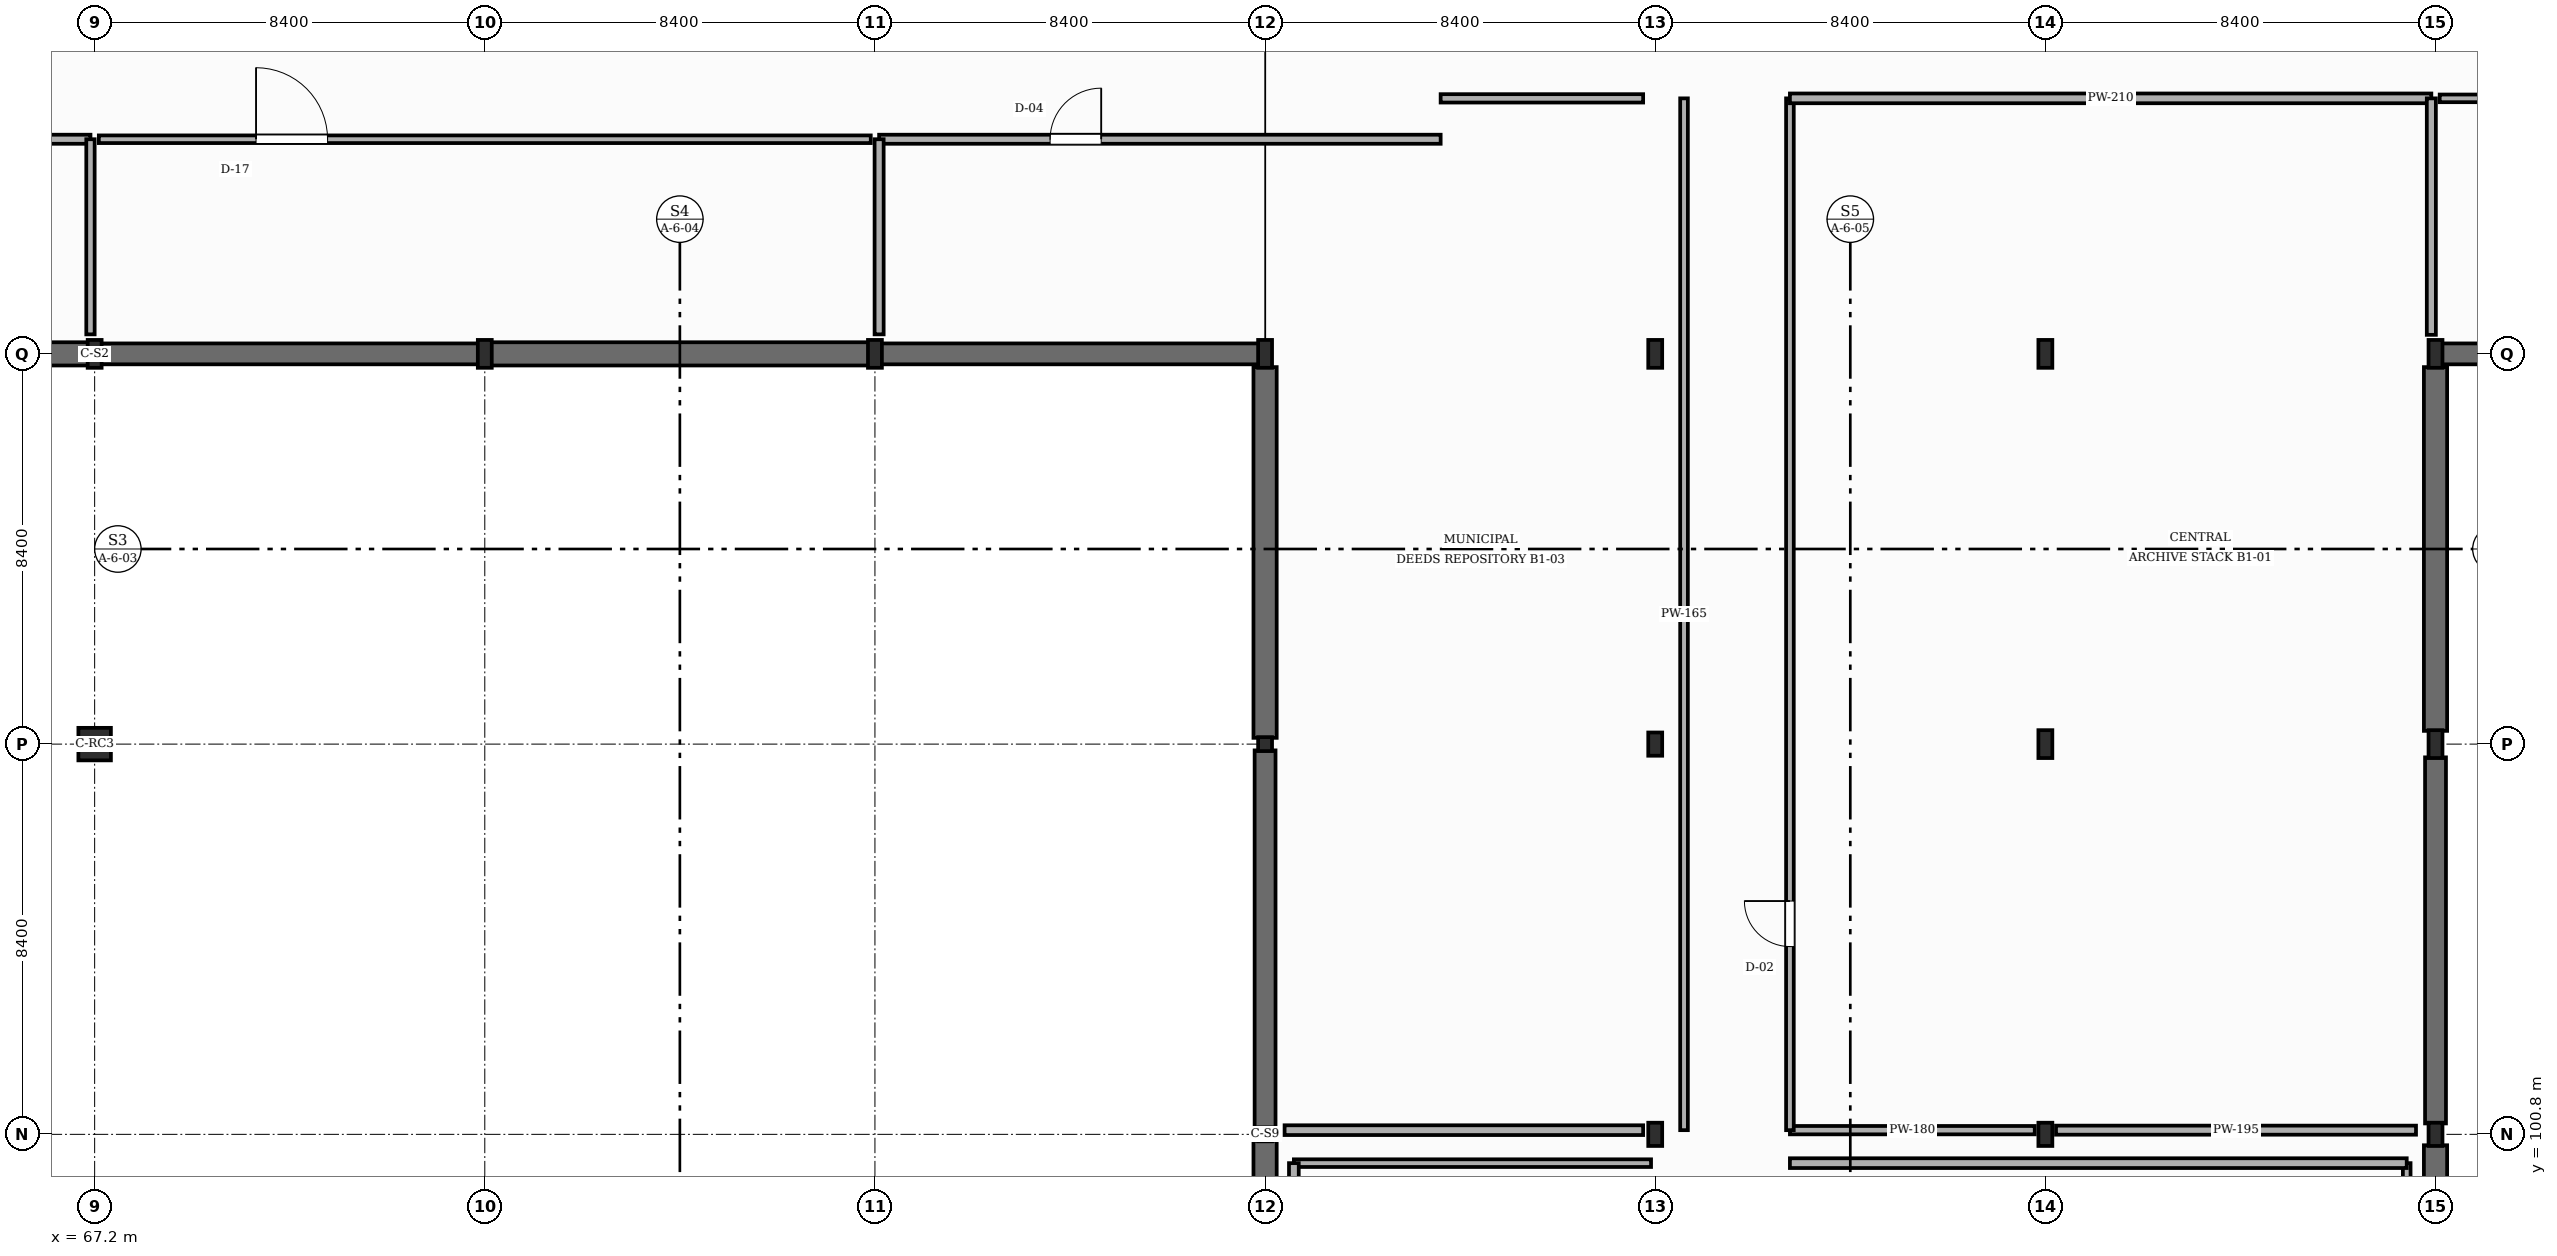
"""IFC4 building model, lengths in metres.
Left out: names, types, materials, properties, quantities, classifications, styles, units other than length and angle.
Written with IfcOpenShell. Run it as: python <this file> out.ifc"""

import sys

from ifc_helpers import new_model, si_unit, direction, frame, frame_2d, origin, origin_2d, place, context, subcontext, project, spatial, rectangle, i_section, extrude, element, fill, save


model = new_model("IFC4")
c1 = context("Model", 3, precision=1e-05, world=origin(), true_north=direction((0.0, 1.0)))
c2 = subcontext(c1, "Body", "Model", "MODEL_VIEW")
j1 = project(units=[si_unit("LENGTHUNIT", "METRE"), si_unit("PLANEANGLEUNIT", "RADIAN")], contexts=[c1])
p1 = place(None, origin())
s1 = spatial("IfcSite", under=j1, at=p1, CompositionType="ELEMENT")
p2 = place(p1, origin())
s2 = spatial("IfcBuilding", under=s1, at=p2, CompositionType="ELEMENT")
p3 = place(p2, frame((0.0, 0.0, -4.5)))
s3 = spatial("IfcBuildingStorey", under=s2, at=p3, CompositionType="ELEMENT", Elevation=-4.5)
p4 = place(p3, frame((67.2, 109.2, 0.0), z_axis=(0.0, 0.0, 1.0), x_axis=(1.0, 0.0, 0.0)))
e1 = element("IfcColumn", 1, at=p4, inside=s3, PredefinedType="COLUMN", context=c2, shape_type="SweptSolid", body=[
    extrude(rectangle(XDim=0.7, YDim=0.7, at=origin_2d()), origin(), (0.0, 0.0, 1.0), 4.5),
])
for number, where, z_axis, x_axis in (
    (2, (67.2, 117.6, 0.0), (0.0, 0.0, 1.0), (1.0, 0.0, 0.0)),
    (3, (75.6, 117.6, 0.0), (0.0, 0.0, 1.0), (1.0, 0.0, 0.0)),
    (4, (84.0, 117.6, 0.0), (0.0, 0.0, 1.0), (1.0, 0.0, 0.0)),
):
    element("IfcColumn", number, at=place(p3, frame(where, z_axis=z_axis, x_axis=x_axis)), inside=s3, PredefinedType="COLUMN", context=c2, shape_type="SweptSolid", body=[
        extrude(i_section(OverallWidth=0.3, OverallDepth=0.6, WebThickness=0.015, FlangeThickness=0.03, FilletRadius=0.027, at=origin_2d()), origin(), (0.0, 0.0, 1.0), 4.5),
    ])
for number, where, z_axis, x_axis in (
    (5, (92.4, 100.8, 0.0), (0.0, 0.0, 1.0), (1.0, 0.0, 0.0)),
    (6, (92.4, 109.2, 0.0), (0.0, 0.0, 1.0), (1.0, 0.0, 0.0)),
):
    element("IfcColumn", number, at=place(p3, frame(where, z_axis=z_axis, x_axis=x_axis)), inside=s3, PredefinedType="COLUMN", context=c2, shape_type="SweptSolid", body=[
        extrude(i_section(OverallWidth=0.3, OverallDepth=0.3, WebThickness=0.011, FlangeThickness=0.019, FilletRadius=0.027, at=origin_2d()), origin(), (0.0, 0.0, 1.0), 4.5),
    ])
p5 = place(p3, frame((92.4, 117.6, 0.0), z_axis=(0.0, 0.0, 1.0), x_axis=(1.0, 0.0, 0.0)))
e7 = element("IfcColumn", 7, at=p5, inside=s3, PredefinedType="COLUMN", context=c2, shape_type="SweptSolid", body=[
    extrude(i_section(OverallWidth=0.3, OverallDepth=0.6, WebThickness=0.015, FlangeThickness=0.03, FilletRadius=0.027, at=origin_2d()), origin(), (0.0, 0.0, 1.0), 4.5),
])
for number, where, z_axis, x_axis in (
    (8, (100.8, 100.8, 0.0), (0.0, 0.0, 1.0), (1.0, 0.0, 0.0)),
    (9, (100.8, 109.2, 0.0), (0.0, 0.0, 1.0), (1.0, 0.0, 0.0)),
):
    element("IfcColumn", number, at=place(p3, frame(where, z_axis=z_axis, x_axis=x_axis)), inside=s3, PredefinedType="COLUMN", context=c2, shape_type="SweptSolid", body=[
        extrude(i_section(OverallWidth=0.3, OverallDepth=0.5, WebThickness=0.014, FlangeThickness=0.028, FilletRadius=0.027, at=origin_2d()), origin(), (0.0, 0.0, 1.0), 4.5),
    ])
p6 = place(p3, frame((100.8, 117.6, 0.0), z_axis=(0.0, 0.0, 1.0), x_axis=(1.0, 0.0, 0.0)))
e10 = element("IfcColumn", 10, at=p6, inside=s3, PredefinedType="COLUMN", context=c2, shape_type="SweptSolid", body=[
    extrude(i_section(OverallWidth=0.3, OverallDepth=0.6, WebThickness=0.015, FlangeThickness=0.03, FilletRadius=0.027, at=origin_2d()), origin(), (0.0, 0.0, 1.0), 4.5),
])
p7 = place(p3, frame((109.2, 100.8, 0.0), z_axis=(0.0, 0.0, 1.0), x_axis=(1.0, 0.0, 0.0)))
e11 = element("IfcColumn", 11, at=p7, inside=s3, PredefinedType="COLUMN", context=c2, shape_type="SweptSolid", body=[
    extrude(i_section(OverallWidth=0.3, OverallDepth=0.5, WebThickness=0.014, FlangeThickness=0.028, FilletRadius=0.027, at=origin_2d()), origin(), (0.0, 0.0, 1.0), 4.5),
])
for number, where, z_axis, x_axis in (
    (12, (109.2, 109.2, 0.0), (0.0, 0.0, 1.0), (1.0, 0.0, 0.0)),
    (13, (109.2, 117.6, 0.0), (0.0, 0.0, 1.0), (1.0, 0.0, 0.0)),
):
    element("IfcColumn", number, at=place(p3, frame(where, z_axis=z_axis, x_axis=x_axis)), inside=s3, PredefinedType="COLUMN", context=c2, shape_type="SweptSolid", body=[
        extrude(i_section(OverallWidth=0.3, OverallDepth=0.6, WebThickness=0.015, FlangeThickness=0.03, FilletRadius=0.027, at=origin_2d()), origin(), (0.0, 0.0, 1.0), 4.5),
    ])
p8 = place(p3, frame((117.6, 100.8, 0.0), z_axis=(0.0, 0.0, 1.0), x_axis=(1.0, 0.0, 0.0)))
e14 = element("IfcColumn", 14, at=p8, inside=s3, PredefinedType="COLUMN", context=c2, shape_type="SweptSolid", body=[
    extrude(i_section(OverallWidth=0.3, OverallDepth=0.5, WebThickness=0.014, FlangeThickness=0.028, FilletRadius=0.027, at=origin_2d()), origin(), (0.0, 0.0, 1.0), 4.5),
])
for number, where, z_axis, x_axis in (
    (15, (117.6, 109.2, 0.0), (0.0, 0.0, 1.0), (1.0, 0.0, 0.0)),
    (16, (117.6, 117.6, 0.0), (0.0, 0.0, 1.0), (1.0, 0.0, 0.0)),
):
    element("IfcColumn", number, at=place(p3, frame(where, z_axis=z_axis, x_axis=x_axis)), inside=s3, PredefinedType="COLUMN", context=c2, shape_type="SweptSolid", body=[
        extrude(i_section(OverallWidth=0.3, OverallDepth=0.6, WebThickness=0.015, FlangeThickness=0.03, FilletRadius=0.027, at=origin_2d()), origin(), (0.0, 0.0, 1.0), 4.5),
    ])
p9 = place(p3, frame((117.6, 92.71, 0.0), z_axis=(0.0, 0.0, 1.0), x_axis=(0.0, 1.0, 0.0)))
e17 = element("IfcWall", 17, at=p9, inside=s3, PredefinedType="USERDEFINED", context=c2, shape_type="SweptSolid", body=[
    extrude(rectangle(XDim=7.855, YDim=0.5, at=frame_2d((3.927, 0.0))), origin(), (0.0, 0.0, 1.0), 4.25),
])
p10 = place(p3, frame((117.6, 101.035, 0.0), z_axis=(0.0, 0.0, 1.0), x_axis=(0.0, 1.0, 0.0)))
e18 = element("IfcWall", 18, at=p10, inside=s3, PredefinedType="USERDEFINED", context=c2, shape_type="SweptSolid", body=[
    extrude(rectangle(XDim=7.88, YDim=0.45, at=frame_2d((3.94, 0.0))), origin(), (0.0, 0.0, 1.0), 4.25),
])
p11 = place(p3, frame((117.6, 109.485, 0.0), z_axis=(0.0, 0.0, 1.0), x_axis=(0.0, 1.0, 0.0)))
e19 = element("IfcWall", 19, at=p11, inside=s3, PredefinedType="USERDEFINED", context=c2, shape_type="SweptSolid", body=[
    extrude(rectangle(XDim=7.83, YDim=0.5, at=frame_2d((3.915, 0.0))), origin(), (0.0, 0.0, 1.0), 4.25),
])
p12 = place(p3, frame((117.608, 117.6, 0.0), z_axis=(0.0, 0.0, 1.0), x_axis=(1.0, 0.0, 0.0)))
e20 = element("IfcWall", 20, at=p12, inside=s3, PredefinedType="USERDEFINED", context=c2, shape_type="SweptSolid", body=[
    extrude(rectangle(XDim=8.384, YDim=0.45, at=frame_2d((4.192, 0.0))), origin(), (0.0, 0.0, 1.0), 4.25),
])
p13 = place(p3, frame((58.808, 117.6, 0.0), z_axis=(0.0, 0.0, 1.0), x_axis=(1.0, 0.0, 0.0)))
e21 = element("IfcWall", 21, at=p13, inside=s3, PredefinedType="USERDEFINED", context=c2, shape_type="SweptSolid", body=[
    extrude(rectangle(XDim=8.384, YDim=0.5, at=frame_2d((4.192, 0.0))), origin(), (0.0, 0.0, 1.0), 4.25),
])
p14 = place(p3, frame((67.208, 117.6, 0.0), z_axis=(0.0, 0.0, 1.0), x_axis=(1.0, 0.0, 0.0)))
e22 = element("IfcWall", 22, at=p14, inside=s3, PredefinedType="USERDEFINED", context=c2, shape_type="SweptSolid", body=[
    extrude(rectangle(XDim=8.384, YDim=0.45, at=frame_2d((4.192, 0.0))), origin(), (0.0, 0.0, 1.0), 4.25),
])
p15 = place(p3, frame((75.608, 117.6, 0.0), z_axis=(0.0, 0.0, 1.0), x_axis=(1.0, 0.0, 0.0)))
e23 = element("IfcWall", 23, at=p15, inside=s3, PredefinedType="USERDEFINED", context=c2, shape_type="SweptSolid", body=[
    extrude(rectangle(XDim=8.384, YDim=0.5, at=frame_2d((4.192, 0.0))), origin(), (0.0, 0.0, 1.0), 4.25),
])
p16 = place(p3, frame((84.008, 117.6, 0.0), z_axis=(0.0, 0.0, 1.0), x_axis=(1.0, 0.0, 0.0)))
e24 = element("IfcWall", 24, at=p16, inside=s3, PredefinedType="USERDEFINED", context=c2, shape_type="SweptSolid", body=[
    extrude(rectangle(XDim=8.384, YDim=0.45, at=frame_2d((4.192, 0.0))), origin(), (0.0, 0.0, 1.0), 4.25),
])
p17 = place(p3, frame((92.4, 117.315, 0.0), z_axis=(0.0, 0.0, 1.0), x_axis=(0.0, -1.0, 0.0)))
e25 = element("IfcWall", 25, at=p17, inside=s3, PredefinedType="USERDEFINED", context=c2, shape_type="SweptSolid", body=[
    extrude(rectangle(XDim=7.98, YDim=0.5, at=frame_2d((3.99, 0.0))), origin(), (0.0, 0.0, 1.0), 4.25),
])
p18 = place(p3, frame((92.4, 109.065, 0.0), z_axis=(0.0, 0.0, 1.0), x_axis=(0.0, -1.0, 0.0)))
e26 = element("IfcWall", 26, at=p18, inside=s3, PredefinedType="USERDEFINED", context=c2, shape_type="SweptSolid", body=[
    extrude(rectangle(XDim=8.13, YDim=0.45, at=frame_2d((4.065, 0.0))), origin(), (0.0, 0.0, 1.0), 4.25),
])
p19 = place(p3, frame((92.4, 100.665, 0.0), z_axis=(0.0, 0.0, 1.0), x_axis=(0.0, -1.0, 0.0)))
e27 = element("IfcWall", 27, at=p19, inside=s3, PredefinedType="USERDEFINED", context=c2, shape_type="SweptSolid", body=[
    extrude(rectangle(XDim=7.955, YDim=0.5, at=frame_2d((3.978, 0.0))), origin(), (0.0, 0.0, 1.0), 4.25),
])
p20 = place(p3, frame((117.18, 100.89, -0.004), z_axis=(0.0, 0.0, 1.0), x_axis=(-1.0, 0.0, 0.0)))
e28 = element("IfcWall", 28, at=p20, inside=s3, PredefinedType="STANDARD", context=c2, shape_type="SweptSolid", body=[
    extrude(rectangle(XDim=7.751, YDim=0.195, at=frame_2d((3.875, 0.0))), origin(), (0.0, 0.0, 1.0), 3.736),
])
p21 = place(p3, frame((108.971, 100.89, -0.004), z_axis=(0.0, 0.0, 1.0), x_axis=(-1.0, 0.0, 0.0)))
e29 = element("IfcWall", 29, at=p21, inside=s3, PredefinedType="STANDARD", context=c2, shape_type="SweptSolid", body=[
    extrude(rectangle(XDim=5.271, YDim=0.18, at=frame_2d((2.636, 0.0))), origin(), (0.0, 0.0, 1.0), 3.686),
])
p22 = place(p3, frame((103.7, 100.89, -0.004), z_axis=(0.0, 0.0, 1.0), x_axis=(0.0, 1.0, 0.0)))
e30 = element("IfcWall", 30, at=p22, inside=s3, PredefinedType="STANDARD", context=c2, shape_type="SweptSolid", body=[
    extrude(rectangle(XDim=22.21, YDim=0.165, at=frame_2d((11.105, 0.0))), origin(), (0.0, 0.0, 1.0), 3.966),
])
p23 = place(p22, frame((3.952, 0.0, 0.015)))
e31 = element("IfcOpeningElement", 31, at=p23, cuts=e30, PredefinedType="OPENING", context=c2, shape_type="SweptSolid", body=[
    extrude(rectangle(XDim=0.98, YDim=2.06, at=frame_2d((0.49, 1.03))), frame((0.0, 0.093, 0.0), z_axis=(0.0, -1.0, 0.0), x_axis=(1.0, 0.0, 0.0)), (0.0, 0.0, 1.0), 0.185),
])
p24 = place(p3, frame((103.7, 123.1, -0.004), z_axis=(0.0, 0.0, 1.0), x_axis=(1.0, 0.0, 0.0)))
e32 = element("IfcWall", 32, at=p24, inside=s3, PredefinedType="STANDARD", context=c2, shape_type="SweptSolid", body=[
    extrude(rectangle(XDim=13.81, YDim=0.21, at=frame_2d((6.905, 0.0))), origin(), (0.0, 0.0, 1.0), 4.254),
])
p25 = place(p3, frame((117.51, 123.1, -0.004), z_axis=(0.0, 0.0, 1.0), x_axis=(0.0, -1.0, 0.0)))
e33 = element("IfcWall", 33, at=p25, inside=s3, PredefinedType="STANDARD", context=c2, shape_type="SweptSolid", body=[
    extrude(rectangle(XDim=5.09, YDim=0.195, at=frame_2d((2.545, 0.0))), origin(), (0.0, 0.0, 1.0), 3.926),
])
p26 = place(p3, frame((116.98, 97.9, -0.004), z_axis=(0.0, 0.0, 1.0), x_axis=(0.0, 1.0, 0.0)))
e34 = element("IfcWall", 34, at=p26, inside=s3, PredefinedType="STANDARD", context=c2, shape_type="SweptSolid", body=[
    extrude(rectangle(XDim=2.28, YDim=0.165, at=frame_2d((1.14, 0.0))), origin(), (0.0, 0.0, 1.0), 4.254),
])
p27 = place(p3, frame((116.98, 100.18, -0.004), z_axis=(0.0, 0.0, 1.0), x_axis=(-1.0, 0.0, 0.0)))
e35 = element("IfcWall", 35, at=p27, inside=s3, PredefinedType="STANDARD", context=c2, shape_type="SweptSolid", body=[
    extrude(rectangle(XDim=13.28, YDim=0.21, at=frame_2d((6.64, 0.0))), origin(), (0.0, 0.0, 1.0), 4.254),
])
p28 = place(p3, frame((84.09, 122.22, -0.004), z_axis=(0.0, 0.0, 1.0), x_axis=(1.0, 0.0, 0.0)))
e36 = element("IfcWall", 36, at=p28, inside=s3, PredefinedType="STANDARD", context=c2, shape_type="SweptSolid", body=[
    extrude(rectangle(XDim=12.09, YDim=0.195, at=frame_2d((6.045, 0.0))), origin(), (0.0, 0.0, 1.0), 4.254),
])
p29 = place(p28, frame((3.681, 0.0, 0.015)))
e37 = element("IfcOpeningElement", 37, at=p29, cuts=e36, PredefinedType="OPENING", context=c2, shape_type="SweptSolid", body=[
    extrude(rectangle(XDim=1.1, YDim=2.06, at=frame_2d((0.55, 1.03))), frame((0.0, 0.107, 0.0), z_axis=(0.0, -1.0, 0.0), x_axis=(1.0, 0.0, 0.0)), (0.0, 0.0, 1.0), 0.215),
])
p30 = place(p3, frame((96.18, 123.1, -0.004), z_axis=(0.0, 0.0, 1.0), x_axis=(1.0, 0.0, 0.0)))
e38 = element("IfcWall", 38, at=p30, inside=s3, PredefinedType="STANDARD", context=c2, shape_type="SweptSolid", body=[
    extrude(rectangle(XDim=4.36, YDim=0.18, at=frame_2d((2.18, 0.0))), origin(), (0.0, 0.0, 1.0), 4.254),
])
p31 = place(p3, frame((101.42, 123.1, -0.004), z_axis=(0.0, 0.0, 1.0), x_axis=(0.0, -1.0, 0.0)))
e39 = element("IfcWall", 39, at=p31, inside=s3, PredefinedType="STANDARD", context=c2, shape_type="SweptSolid", body=[
    extrude(rectangle(XDim=22.21, YDim=0.165, at=frame_2d((11.105, 0.0))), origin(), (0.0, 0.0, 1.0), 4.254),
])
p32 = place(p3, frame((100.54, 100.89, -0.004), z_axis=(0.0, 0.0, 1.0), x_axis=(-1.0, 0.0, 0.0)))
e40 = element("IfcWall", 40, at=p32, inside=s3, PredefinedType="STANDARD", context=c2, shape_type="SweptSolid", body=[
    extrude(rectangle(XDim=7.72, YDim=0.21, at=frame_2d((3.86, 0.0))), origin(), (0.0, 0.0, 1.0), 3.906),
])
p33 = place(p3, frame((84.09, 118.02, -0.004), z_axis=(0.0, 0.0, 1.0), x_axis=(0.0, 1.0, 0.0)))
e41 = element("IfcWall", 41, at=p33, inside=s3, PredefinedType="STANDARD", context=c2, shape_type="SweptSolid", body=[
    extrude(rectangle(XDim=4.2, YDim=0.195, at=frame_2d((2.1, 0.0))), origin(), (0.0, 0.0, 1.0), 3.636),
])
p34 = place(p3, frame((100.71, 100.18, -0.004), z_axis=(0.0, 0.0, 1.0), x_axis=(-1.0, 0.0, 0.0)))
e42 = element("IfcWall", 42, at=p34, inside=s3, PredefinedType="STANDARD", context=c2, shape_type="SweptSolid", body=[
    extrude(rectangle(XDim=7.69, YDim=0.165, at=frame_2d((3.845, 0.0))), origin(), (0.0, 0.0, 1.0), 4.254),
])
p35 = place(p3, frame((93.02, 100.18, -0.004), z_axis=(0.0, 0.0, 1.0), x_axis=(0.0, -1.0, 0.0)))
e43 = element("IfcWall", 43, at=p35, inside=s3, PredefinedType="STANDARD", context=c2, shape_type="SweptSolid", body=[
    extrude(rectangle(XDim=2.28, YDim=0.21, at=frame_2d((1.14, 0.0))), origin(), (0.0, 0.0, 1.0), 4.254),
])
p36 = place(p3, frame((53.3, 122.22, -0.004), z_axis=(0.0, 0.0, 1.0), x_axis=(1.0, 0.0, 0.0)))
e44 = element("IfcWall", 44, at=p36, inside=s3, PredefinedType="STANDARD", context=c2, shape_type="SweptSolid", body=[
    extrude(rectangle(XDim=13.81, YDim=0.195, at=frame_2d((6.905, 0.0))), origin(), (0.0, 0.0, 1.0), 4.254),
])
p37 = place(p36, frame((9.897, 0.0, 0.015)))
e45 = element("IfcOpeningElement", 45, at=p37, cuts=e44, PredefinedType="OPENING", context=c2, shape_type="SweptSolid", body=[
    extrude(rectangle(XDim=0.92, YDim=2.14, at=frame_2d((0.46, 1.07))), frame((0.0, 0.107, 0.0), z_axis=(0.0, -1.0, 0.0), x_axis=(1.0, 0.0, 0.0)), (0.0, 0.0, 1.0), 0.215),
])
p38 = place(p3, frame((67.11, 122.22, -0.004), z_axis=(0.0, 0.0, 1.0), x_axis=(0.0, -1.0, 0.0)))
e46 = element("IfcWall", 46, at=p38, inside=s3, PredefinedType="STANDARD", context=c2, shape_type="SweptSolid", body=[
    extrude(rectangle(XDim=4.2, YDim=0.18, at=frame_2d((2.1, 0.0))), origin(), (0.0, 0.0, 1.0), 3.886),
])
p39 = place(p3, frame((117.69, 123.1, -0.004), z_axis=(0.0, 0.0, 1.0), x_axis=(1.0, 0.0, 0.0)))
e47 = element("IfcWall", 47, at=p39, inside=s3, PredefinedType="STANDARD", context=c2, shape_type="SweptSolid", body=[
    extrude(rectangle(XDim=16.62, YDim=0.165, at=frame_2d((8.31, 0.0))), origin(), (0.0, 0.0, 1.0), 4.254),
])
p40 = place(p39, frame((3.605, 0.0, 0.015)))
e48 = element("IfcOpeningElement", 48, at=p40, cuts=e47, PredefinedType="OPENING", context=c2, shape_type="SweptSolid", body=[
    extrude(rectangle(XDim=1.1, YDim=2.14, at=frame_2d((0.55, 1.07))), frame((0.0, 0.093, 0.0), z_axis=(0.0, -1.0, 0.0), x_axis=(1.0, 0.0, 0.0)), (0.0, 0.0, 1.0), 0.185),
])
p41 = place(p3, frame((67.29, 122.22, -0.004), z_axis=(0.0, 0.0, 1.0), x_axis=(1.0, 0.0, 0.0)))
e49 = element("IfcWall", 49, at=p41, inside=s3, PredefinedType="STANDARD", context=c2, shape_type="SweptSolid", body=[
    extrude(rectangle(XDim=16.62, YDim=0.165, at=frame_2d((8.31, 0.0))), origin(), (0.0, 0.0, 1.0), 4.254),
])
p42 = place(p41, frame((3.385, 0.0, 0.015)))
e50 = element("IfcOpeningElement", 50, at=p42, cuts=e49, PredefinedType="OPENING", context=c2, shape_type="SweptSolid", body=[
    extrude(rectangle(XDim=1.54, YDim=2.14, at=frame_2d((0.77, 1.07))), frame((0.0, 0.093, 0.0), z_axis=(0.0, -1.0, 0.0), x_axis=(1.0, 0.0, 0.0)), (0.0, 0.0, 1.0), 0.185),
])
p43 = place(p23, origin())
e51 = element("IfcDoor", 51, at=p43, inside=s3, OperationType="SINGLE_SWING_RIGHT", PredefinedType="DOOR", context=c2, shape_type="SweptSolid", body=[
    extrude(rectangle(XDim=0.98, YDim=2.06, at=frame_2d((0.49, 1.03))), frame((0.0, 0.025, 0.0), z_axis=(0.0, -1.0, 0.0), x_axis=(1.0, 0.0, 0.0)), (0.0, 0.0, 1.0), 0.05),
])
fill(e31, e51)
p44 = place(p29, origin())
e52 = element("IfcDoor", 52, at=p44, inside=s3, OperationType="SINGLE_SWING_RIGHT", PredefinedType="DOOR", context=c2, shape_type="SweptSolid", body=[
    extrude(rectangle(XDim=1.1, YDim=2.06, at=frame_2d((0.55, 1.03))), frame((0.0, 0.025, 0.0), z_axis=(0.0, -1.0, 0.0), x_axis=(1.0, 0.0, 0.0)), (0.0, 0.0, 1.0), 0.05),
])
fill(e37, e52)
p45 = place(p42, origin())
e53 = element("IfcDoor", 53, at=p45, inside=s3, OperationType="SINGLE_SWING_LEFT", PredefinedType="DOOR", context=c2, shape_type="SweptSolid", body=[
    extrude(rectangle(XDim=1.54, YDim=2.14, at=frame_2d((0.77, 1.07))), frame((0.0, 0.025, 0.0), z_axis=(0.0, -1.0, 0.0), x_axis=(1.0, 0.0, 0.0)), (0.0, 0.0, 1.0), 0.05),
])
fill(e50, e53)
save(model, sys.argv[1])
